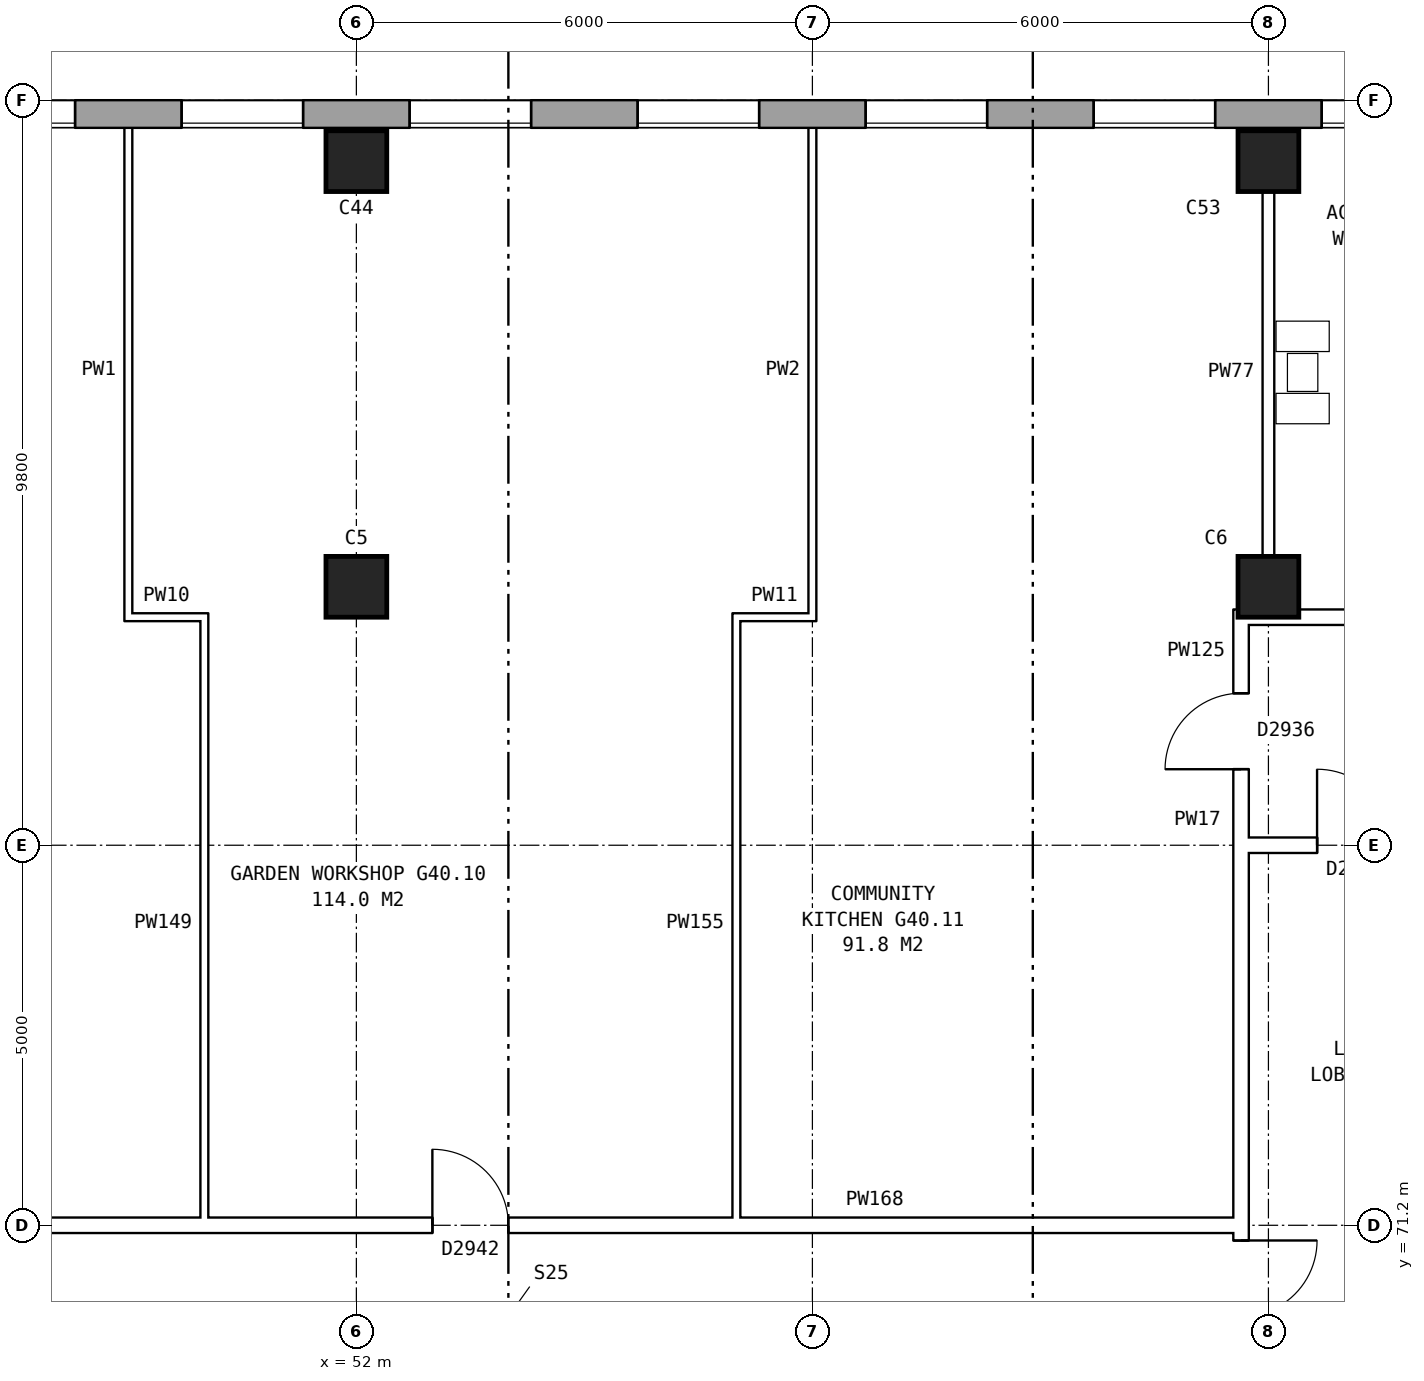
"""IFC4 building model, lengths in metres.
Left out: names, types, materials, properties, quantities, classifications, styles, units other than length and angle.
Written with IfcOpenShell. Run it as: python <this file> out.ifc"""

import sys

from ifc_helpers import new_model, si_unit, direction, frame, frame_2d, origin, origin_2d, place, context, subcontext, project, spatial, rectangle, extrude, element, fill, save


model = new_model("IFC4")
c1 = context("Model", 3, precision=1e-05, world=origin(), true_north=direction((0.0, 1.0)))
c2 = subcontext(c1, "Body", "Model", "MODEL_VIEW")
j1 = project(units=[si_unit("LENGTHUNIT", "METRE"), si_unit("PLANEANGLEUNIT", "RADIAN")], contexts=[c1])
p1 = place(None, origin())
s1 = spatial("IfcSite", under=j1, at=p1, CompositionType="ELEMENT")
p2 = place(p1, origin())
s2 = spatial("IfcBuilding", under=s1, at=p2, CompositionType="ELEMENT")
p3 = place(p2, frame((0.0, 0.0, 142.3)))
s3 = spatial("IfcBuildingStorey", under=s2, at=p3, CompositionType="ELEMENT", Elevation=142.3)
for number, where, z_axis, x_axis in (
    (1, (52.0, 79.6, 0.0), (0.0, 0.0, 1.0), (1.0, 0.0, 0.0)),
    (2, (52.0, 85.2, 0.0), (0.0, 0.0, 1.0), (1.0, 0.0, 0.0)),
    (3, (64.0, 79.6, 0.0), (0.0, 0.0, 1.0), (1.0, 0.0, 0.0)),
    (4, (64.0, 85.2, 0.0), (0.0, 0.0, 1.0), (1.0, 0.0, 0.0)),
):
    element("IfcColumn", number, at=place(p3, frame(where, z_axis=z_axis, x_axis=x_axis)), inside=s3, PredefinedType="COLUMN", context=c2, shape_type="SweptSolid", body=[
        extrude(rectangle(XDim=0.8, YDim=0.8, at=origin_2d()), origin(), (0.0, 0.0, 1.0), 5.6),
    ])
p4 = place(p3, frame((72.925, 85.82, 0.0), z_axis=(0.0, 0.0, 1.0), x_axis=(-1.0, 0.0, 0.0)))
e5 = element("IfcWall", 5, at=p4, inside=s3, PredefinedType="STANDARD", context=c2, shape_type="SweptSolid", body=[
    extrude(rectangle(XDim=41.351, YDim=0.36, at=frame_2d((20.675, 0.0))), origin(), (0.0, 0.0, 1.0), 5.6),
])
p5 = place(p4, frame((0.625, 0.0, 0.15)))
e6 = element("IfcOpeningElement", 6, at=p5, cuts=e5, PredefinedType="OPENING", context=c2, shape_type="SweptSolid", body=[
    extrude(rectangle(XDim=1.6, YDim=2.4, at=frame_2d((0.8, 1.2))), frame((0.0, 0.19, 0.0), z_axis=(0.0, -1.0, 0.0), x_axis=(1.0, 0.0, 0.0)), (0.0, 0.0, 1.0), 0.38),
])
p6 = place(p4, frame((3.625, 0.0, 0.15)))
e7 = element("IfcOpeningElement", 7, at=p6, cuts=e5, PredefinedType="OPENING", context=c2, shape_type="SweptSolid", body=[
    extrude(rectangle(XDim=1.6, YDim=2.4, at=frame_2d((0.8, 1.2))), frame((0.0, 0.19, 0.0), z_axis=(0.0, -1.0, 0.0), x_axis=(1.0, 0.0, 0.0)), (0.0, 0.0, 1.0), 0.38),
])
p7 = place(p4, frame((6.625, 0.0, 0.15)))
e8 = element("IfcOpeningElement", 8, at=p7, cuts=e5, PredefinedType="OPENING", context=c2, shape_type="SweptSolid", body=[
    extrude(rectangle(XDim=1.6, YDim=2.4, at=frame_2d((0.8, 1.2))), frame((0.0, 0.19, 0.0), z_axis=(0.0, -1.0, 0.0), x_axis=(1.0, 0.0, 0.0)), (0.0, 0.0, 1.0), 0.38),
])
p8 = place(p4, frame((9.625, 0.0, 0.15)))
e9 = element("IfcOpeningElement", 9, at=p8, cuts=e5, PredefinedType="OPENING", context=c2, shape_type="SweptSolid", body=[
    extrude(rectangle(XDim=1.6, YDim=2.4, at=frame_2d((0.8, 1.2))), frame((0.0, 0.19, 0.0), z_axis=(0.0, -1.0, 0.0), x_axis=(1.0, 0.0, 0.0)), (0.0, 0.0, 1.0), 0.38),
])
p9 = place(p4, frame((12.625, 0.0, 0.15)))
e10 = element("IfcOpeningElement", 10, at=p9, cuts=e5, PredefinedType="OPENING", context=c2, shape_type="SweptSolid", body=[
    extrude(rectangle(XDim=1.6, YDim=2.4, at=frame_2d((0.8, 1.2))), frame((0.0, 0.19, 0.0), z_axis=(0.0, -1.0, 0.0), x_axis=(1.0, 0.0, 0.0)), (0.0, 0.0, 1.0), 0.38),
])
p10 = place(p4, frame((15.625, 0.0, 0.15)))
e11 = element("IfcOpeningElement", 11, at=p10, cuts=e5, PredefinedType="OPENING", context=c2, shape_type="SweptSolid", body=[
    extrude(rectangle(XDim=1.6, YDim=2.4, at=frame_2d((0.8, 1.2))), frame((0.0, 0.19, 0.0), z_axis=(0.0, -1.0, 0.0), x_axis=(1.0, 0.0, 0.0)), (0.0, 0.0, 1.0), 0.38),
])
p11 = place(p4, frame((18.625, 0.0, 0.15)))
e12 = element("IfcOpeningElement", 12, at=p11, cuts=e5, PredefinedType="OPENING", context=c2, shape_type="SweptSolid", body=[
    extrude(rectangle(XDim=1.6, YDim=2.4, at=frame_2d((0.8, 1.2))), frame((0.0, 0.19, 0.0), z_axis=(0.0, -1.0, 0.0), x_axis=(1.0, 0.0, 0.0)), (0.0, 0.0, 1.0), 0.38),
])
p12 = place(p4, frame((21.625, 0.0, 0.15)))
e13 = element("IfcOpeningElement", 13, at=p12, cuts=e5, PredefinedType="OPENING", context=c2, shape_type="SweptSolid", body=[
    extrude(rectangle(XDim=1.6, YDim=2.4, at=frame_2d((0.8, 1.2))), frame((0.0, 0.19, 0.0), z_axis=(0.0, -1.0, 0.0), x_axis=(1.0, 0.0, 0.0)), (0.0, 0.0, 1.0), 0.38),
])
p13 = place(p4, frame((24.625, 0.0, 0.15)))
e14 = element("IfcOpeningElement", 14, at=p13, cuts=e5, PredefinedType="OPENING", context=c2, shape_type="SweptSolid", body=[
    extrude(rectangle(XDim=1.6, YDim=2.4, at=frame_2d((0.8, 1.2))), frame((0.0, 0.19, 0.0), z_axis=(0.0, -1.0, 0.0), x_axis=(1.0, 0.0, 0.0)), (0.0, 0.0, 1.0), 0.38),
])
p14 = place(p4, frame((27.625, 0.0, 0.15)))
e15 = element("IfcOpeningElement", 15, at=p14, cuts=e5, PredefinedType="OPENING", context=c2, shape_type="SweptSolid", body=[
    extrude(rectangle(XDim=1.6, YDim=2.4, at=frame_2d((0.8, 1.2))), frame((0.0, 0.19, 0.0), z_axis=(0.0, -1.0, 0.0), x_axis=(1.0, 0.0, 0.0)), (0.0, 0.0, 1.0), 0.38),
])
p15 = place(p4, frame((30.625, 0.0, 0.15)))
e16 = element("IfcOpeningElement", 16, at=p15, cuts=e5, PredefinedType="OPENING", context=c2, shape_type="SweptSolid", body=[
    extrude(rectangle(XDim=1.6, YDim=2.4, at=frame_2d((0.8, 1.2))), frame((0.0, 0.19, 0.0), z_axis=(0.0, -1.0, 0.0), x_axis=(1.0, 0.0, 0.0)), (0.0, 0.0, 1.0), 0.38),
])
p16 = place(p4, frame((33.625, 0.0, 0.15)))
e17 = element("IfcOpeningElement", 17, at=p16, cuts=e5, PredefinedType="OPENING", context=c2, shape_type="SweptSolid", body=[
    extrude(rectangle(XDim=1.6, YDim=2.4, at=frame_2d((0.8, 1.2))), frame((0.0, 0.19, 0.0), z_axis=(0.0, -1.0, 0.0), x_axis=(1.0, 0.0, 0.0)), (0.0, 0.0, 1.0), 0.38),
])
p17 = place(p4, frame((36.625, 0.0, 0.15)))
e18 = element("IfcOpeningElement", 18, at=p17, cuts=e5, PredefinedType="OPENING", context=c2, shape_type="SweptSolid", body=[
    extrude(rectangle(XDim=1.6, YDim=2.4, at=frame_2d((0.8, 1.2))), frame((0.0, 0.19, 0.0), z_axis=(0.0, -1.0, 0.0), x_axis=(1.0, 0.0, 0.0)), (0.0, 0.0, 1.0), 0.38),
])
p18 = place(p3, frame((63.64, 63.9, 0.0), z_axis=(0.0, 0.0, 1.0), x_axis=(0.0, 1.0, 0.0)))
e19 = element("IfcWall", 19, at=p18, inside=s3, PredefinedType="PARTITIONING", context=c2, shape_type="SweptSolid", body=[
    extrude(rectangle(XDim=12.2, YDim=0.2, at=frame_2d((6.1, 0.0))), origin(), (0.0, 0.0, 1.0), 5.6),
])
p19 = place(p18, frame((5.1, 0.0, 0.0)))
e20 = element("IfcOpeningElement", 20, at=p19, cuts=e19, PredefinedType="OPENING", context=c2, shape_type="SweptSolid", body=[
    extrude(rectangle(XDim=2.0, YDim=2.1, at=frame_2d((1.0, 1.05))), frame((0.0, 0.11, 0.0), z_axis=(0.0, -1.0, 0.0), x_axis=(1.0, 0.0, 0.0)), (0.0, 0.0, 1.0), 0.22),
])
p20 = place(p3, frame((44.36, 71.2, 0.0), z_axis=(0.0, 0.0, 1.0), x_axis=(1.0, 0.0, 0.0)))
e21 = element("IfcWall", 21, at=p20, inside=s3, PredefinedType="PARTITIONING", context=c2, shape_type="SweptSolid", body=[
    extrude(rectangle(XDim=19.28, YDim=0.2, at=frame_2d((9.64, 0.0))), origin(), (0.0, 0.0, 1.0), 5.6),
])
p21 = place(p20, frame((8.64, 0.0, 0.0)))
e22 = element("IfcOpeningElement", 22, at=p21, cuts=e21, PredefinedType="OPENING", context=c2, shape_type="SweptSolid", body=[
    extrude(rectangle(XDim=1.0, YDim=2.1, at=frame_2d((0.5, 1.05))), frame((0.0, 0.11, 0.0), z_axis=(0.0, -1.0, 0.0), x_axis=(1.0, 0.0, 0.0)), (0.0, 0.0, 1.0), 0.22),
])
p22 = place(p3, frame((63.54, 76.2, 0.0), z_axis=(0.0, 0.0, 1.0), x_axis=(1.0, 0.0, 0.0)))
e23 = element("IfcWall", 23, at=p22, inside=s3, PredefinedType="PARTITIONING", context=c2, shape_type="SweptSolid", body=[
    extrude(rectangle(XDim=3.1, YDim=0.2, at=frame_2d((1.55, 0.0))), origin(), (0.0, 0.0, 1.0), 5.6),
])
p23 = place(p22, frame((1.1, 0.0, 0.0)))
e24 = element("IfcOpeningElement", 24, at=p23, cuts=e23, PredefinedType="OPENING", context=c2, shape_type="SweptSolid", body=[
    extrude(rectangle(XDim=1.0, YDim=2.1, at=frame_2d((0.5, 1.05))), frame((0.0, 0.11, 0.0), z_axis=(0.0, -1.0, 0.0), x_axis=(1.0, 0.0, 0.0)), (0.0, 0.0, 1.0), 0.22),
])
p24 = place(p3, frame((63.54, 79.2, 0.0), z_axis=(0.0, 0.0, 1.0), x_axis=(1.0, 0.0, 0.0)))
e25 = element("IfcWall", 25, at=p24, inside=s3, PredefinedType="PARTITIONING", context=c2, shape_type="SweptSolid", body=[
    extrude(rectangle(XDim=12.22, YDim=0.2, at=frame_2d((6.11, 0.0))), origin(), (0.0, 0.0, 1.0), 5.6),
])
p25 = place(p24, frame((1.51, 0.0, 0.0)))
e26 = element("IfcOpeningElement", 26, at=p25, cuts=e25, PredefinedType="OPENING", context=c2, shape_type="SweptSolid", body=[
    extrude(rectangle(XDim=0.9, YDim=2.1, at=frame_2d((0.45, 1.05))), frame((0.0, 0.11, 0.0), z_axis=(0.0, -1.0, 0.0), x_axis=(1.0, 0.0, 0.0)), (0.0, 0.0, 1.0), 0.22),
])
p26 = place(p24, frame((4.51, 0.0, 0.0)))
e27 = element("IfcOpeningElement", 27, at=p26, cuts=e25, PredefinedType="OPENING", context=c2, shape_type="SweptSolid", body=[
    extrude(rectangle(XDim=0.9, YDim=2.1, at=frame_2d((0.45, 1.05))), frame((0.0, 0.11, 0.0), z_axis=(0.0, -1.0, 0.0), x_axis=(1.0, 0.0, 0.0)), (0.0, 0.0, 1.0), 0.22),
])
p27 = place(p24, frame((7.51, 0.0, 0.0)))
e28 = element("IfcOpeningElement", 28, at=p27, cuts=e25, PredefinedType="OPENING", context=c2, shape_type="SweptSolid", body=[
    extrude(rectangle(XDim=0.9, YDim=2.1, at=frame_2d((0.45, 1.05))), frame((0.0, 0.11, 0.0), z_axis=(0.0, -1.0, 0.0), x_axis=(1.0, 0.0, 0.0)), (0.0, 0.0, 1.0), 0.22),
])
p28 = place(p24, frame((10.28, 0.0, 0.0)))
e29 = element("IfcOpeningElement", 29, at=p28, cuts=e25, PredefinedType="OPENING", context=c2, shape_type="SweptSolid", body=[
    extrude(rectangle(XDim=1.0, YDim=2.1, at=frame_2d((0.5, 1.05))), frame((0.0, 0.11, 0.0), z_axis=(0.0, -1.0, 0.0), x_axis=(1.0, 0.0, 0.0)), (0.0, 0.0, 1.0), 0.22),
])
for number, where, z_axis, x_axis in (
    (30, (48.95, 79.2, 0.0), (0.0, 0.0, 1.0), (1.0, 0.0, 0.0)),
    (31, (56.95, 79.2, 0.0), (0.0, 0.0, 1.0), (1.0, 0.0, 0.0)),
):
    element("IfcWall", number, at=place(p3, frame(where, z_axis=z_axis, x_axis=x_axis)), inside=s3, PredefinedType="PARTITIONING", context=c2, shape_type="SweptSolid", body=[
        extrude(rectangle(XDim=1.1, YDim=0.1, at=frame_2d((0.55, 0.0))), origin(), (0.0, 0.0, 1.0), 5.6),
    ])
p29 = place(p3, frame((49.0, 79.15, 0.0), z_axis=(0.0, 0.0, 1.0), x_axis=(0.0, 1.0, 0.0)))
e32 = element("IfcWall", 32, at=p29, inside=s3, PredefinedType="PARTITIONING", context=c2, shape_type="SweptSolid", body=[
    extrude(rectangle(XDim=6.61, YDim=0.1, at=frame_2d((3.305, 0.0))), origin(), (0.0, 0.0, 1.0), 5.6),
])
for number, where, z_axis, x_axis in (
    (33, (50.0, 71.1, 0.0), (0.0, 0.0, 1.0), (0.0, 1.0, 0.0)),
    (34, (57.0, 71.1, 0.0), (0.0, 0.0, 1.0), (0.0, 1.0, 0.0)),
):
    element("IfcWall", number, at=place(p3, frame(where, z_axis=z_axis, x_axis=x_axis)), inside=s3, PredefinedType="PARTITIONING", context=c2, shape_type="SweptSolid", body=[
        extrude(rectangle(XDim=8.15, YDim=0.1, at=frame_2d((4.075, 0.0))), origin(), (0.0, 0.0, 1.0), 5.6),
    ])
p30 = place(p3, frame((58.0, 79.15, 0.0), z_axis=(0.0, 0.0, 1.0), x_axis=(0.0, 1.0, 0.0)))
e35 = element("IfcWall", 35, at=p30, inside=s3, PredefinedType="PARTITIONING", context=c2, shape_type="SweptSolid", body=[
    extrude(rectangle(XDim=6.61, YDim=0.1, at=frame_2d((3.305, 0.0))), origin(), (0.0, 0.0, 1.0), 5.6),
])
p31 = place(p3, frame((63.64, 76.1, 0.0), z_axis=(0.0, 0.0, 1.0), x_axis=(0.0, 1.0, 0.0)))
e36 = element("IfcWall", 36, at=p31, inside=s3, PredefinedType="PARTITIONING", context=c2, shape_type="SweptSolid", body=[
    extrude(rectangle(XDim=3.2, YDim=0.2, at=frame_2d((1.6, 0.0))), origin(), (0.0, 0.0, 1.0), 5.6),
])
p32 = place(p31, frame((1.1, 0.0, 0.0)))
e37 = element("IfcOpeningElement", 37, at=p32, cuts=e36, PredefinedType="OPENING", context=c2, shape_type="SweptSolid", body=[
    extrude(rectangle(XDim=1.0, YDim=2.1, at=frame_2d((0.5, 1.05))), frame((0.0, 0.11, 0.0), z_axis=(0.0, -1.0, 0.0), x_axis=(1.0, 0.0, 0.0)), (0.0, 0.0, 1.0), 0.22),
])
p33 = place(p3, frame((64.0, 79.1, 0.0), z_axis=(0.0, 0.0, 1.0), x_axis=(0.0, 1.0, 0.0)))
e38 = element("IfcWall", 38, at=p33, inside=s3, PredefinedType="PLUMBINGWALL", context=c2, shape_type="SweptSolid", body=[
    extrude(rectangle(XDim=6.66, YDim=0.15, at=frame_2d((3.33, 0.0))), origin(), (0.0, 0.0, 1.0), 5.6),
])
p34 = place(p7, origin())
e39 = element("IfcWindow", 39, at=p34, inside=s3, PartitioningType="SINGLE_PANEL", PredefinedType="WINDOW", context=c2, shape_type="SweptSolid", body=[
    extrude(rectangle(XDim=1.6, YDim=2.4, at=frame_2d((0.8, 1.2))), frame((0.0, 0.15, 0.0), z_axis=(0.0, -1.0, 0.0), x_axis=(1.0, 0.0, 0.0)), (0.0, 0.0, 1.0), 0.06),
])
fill(e8, e39)
p35 = place(p8, origin())
e40 = element("IfcWindow", 40, at=p35, inside=s3, PartitioningType="SINGLE_PANEL", PredefinedType="WINDOW", context=c2, shape_type="SweptSolid", body=[
    extrude(rectangle(XDim=1.6, YDim=2.4, at=frame_2d((0.8, 1.2))), frame((0.0, 0.15, 0.0), z_axis=(0.0, -1.0, 0.0), x_axis=(1.0, 0.0, 0.0)), (0.0, 0.0, 1.0), 0.06),
])
fill(e9, e40)
p36 = place(p9, origin())
e41 = element("IfcWindow", 41, at=p36, inside=s3, PartitioningType="SINGLE_PANEL", PredefinedType="WINDOW", context=c2, shape_type="SweptSolid", body=[
    extrude(rectangle(XDim=1.6, YDim=2.4, at=frame_2d((0.8, 1.2))), frame((0.0, 0.15, 0.0), z_axis=(0.0, -1.0, 0.0), x_axis=(1.0, 0.0, 0.0)), (0.0, 0.0, 1.0), 0.06),
])
fill(e10, e41)
p37 = place(p10, origin())
e42 = element("IfcWindow", 42, at=p37, inside=s3, PartitioningType="SINGLE_PANEL", PredefinedType="WINDOW", context=c2, shape_type="SweptSolid", body=[
    extrude(rectangle(XDim=1.6, YDim=2.4, at=frame_2d((0.8, 1.2))), frame((0.0, 0.15, 0.0), z_axis=(0.0, -1.0, 0.0), x_axis=(1.0, 0.0, 0.0)), (0.0, 0.0, 1.0), 0.06),
])
fill(e11, e42)
p38 = place(p11, origin())
e43 = element("IfcWindow", 43, at=p38, inside=s3, PartitioningType="SINGLE_PANEL", PredefinedType="WINDOW", context=c2, shape_type="SweptSolid", body=[
    extrude(rectangle(XDim=1.6, YDim=2.4, at=frame_2d((0.8, 1.2))), frame((0.0, 0.15, 0.0), z_axis=(0.0, -1.0, 0.0), x_axis=(1.0, 0.0, 0.0)), (0.0, 0.0, 1.0), 0.06),
])
fill(e12, e43)
p39 = place(p12, origin())
e44 = element("IfcWindow", 44, at=p39, inside=s3, PartitioningType="SINGLE_PANEL", PredefinedType="WINDOW", context=c2, shape_type="SweptSolid", body=[
    extrude(rectangle(XDim=1.6, YDim=2.4, at=frame_2d((0.8, 1.2))), frame((0.0, 0.15, 0.0), z_axis=(0.0, -1.0, 0.0), x_axis=(1.0, 0.0, 0.0)), (0.0, 0.0, 1.0), 0.06),
])
fill(e13, e44)
p40 = place(p13, origin())
e45 = element("IfcWindow", 45, at=p40, inside=s3, PartitioningType="SINGLE_PANEL", PredefinedType="WINDOW", context=c2, shape_type="SweptSolid", body=[
    extrude(rectangle(XDim=1.6, YDim=2.4, at=frame_2d((0.8, 1.2))), frame((0.0, 0.15, 0.0), z_axis=(0.0, -1.0, 0.0), x_axis=(1.0, 0.0, 0.0)), (0.0, 0.0, 1.0), 0.06),
])
fill(e14, e45)
p41 = place(p19, frame((2.0, 0.0, 0.0), z_axis=(0.0, 0.0, 1.0), x_axis=(-1.0, 0.0, 0.0)))
e46 = element("IfcDoor", 46, at=p41, inside=s3, OperationType="DOUBLE_DOOR_SINGLE_SWING", PredefinedType="DOOR", context=c2, shape_type="SweptSolid", body=[
    extrude(rectangle(XDim=2.0, YDim=2.1, at=frame_2d((1.0, 1.05))), frame((0.0, 0.025, 0.0), z_axis=(0.0, -1.0, 0.0), x_axis=(1.0, 0.0, 0.0)), (0.0, 0.0, 1.0), 0.05),
])
fill(e20, e46)
p42 = place(p21, origin())
e47 = element("IfcDoor", 47, at=p42, inside=s3, OperationType="SINGLE_SWING_LEFT", PredefinedType="DOOR", context=c2, shape_type="SweptSolid", body=[
    extrude(rectangle(XDim=1.0, YDim=2.1, at=frame_2d((0.5, 1.05))), frame((0.0, 0.025, 0.0), z_axis=(0.0, -1.0, 0.0), x_axis=(1.0, 0.0, 0.0)), (0.0, 0.0, 1.0), 0.05),
])
fill(e22, e47)
p43 = place(p23, origin())
e48 = element("IfcDoor", 48, at=p43, inside=s3, OperationType="SINGLE_SWING_LEFT", PredefinedType="DOOR", context=c2, shape_type="SweptSolid", body=[
    extrude(rectangle(XDim=1.0, YDim=2.1, at=frame_2d((0.5, 1.05))), frame((0.0, 0.025, 0.0), z_axis=(0.0, -1.0, 0.0), x_axis=(1.0, 0.0, 0.0)), (0.0, 0.0, 1.0), 0.05),
])
fill(e24, e48)
p44 = place(p32, origin())
e49 = element("IfcDoor", 49, at=p44, inside=s3, OperationType="SINGLE_SWING_LEFT", PredefinedType="DOOR", context=c2, shape_type="SweptSolid", body=[
    extrude(rectangle(XDim=1.0, YDim=2.1, at=frame_2d((0.5, 1.05))), frame((0.0, 0.025, 0.0), z_axis=(0.0, -1.0, 0.0), x_axis=(1.0, 0.0, 0.0)), (0.0, 0.0, 1.0), 0.05),
])
fill(e37, e49)
save(model, sys.argv[1])
